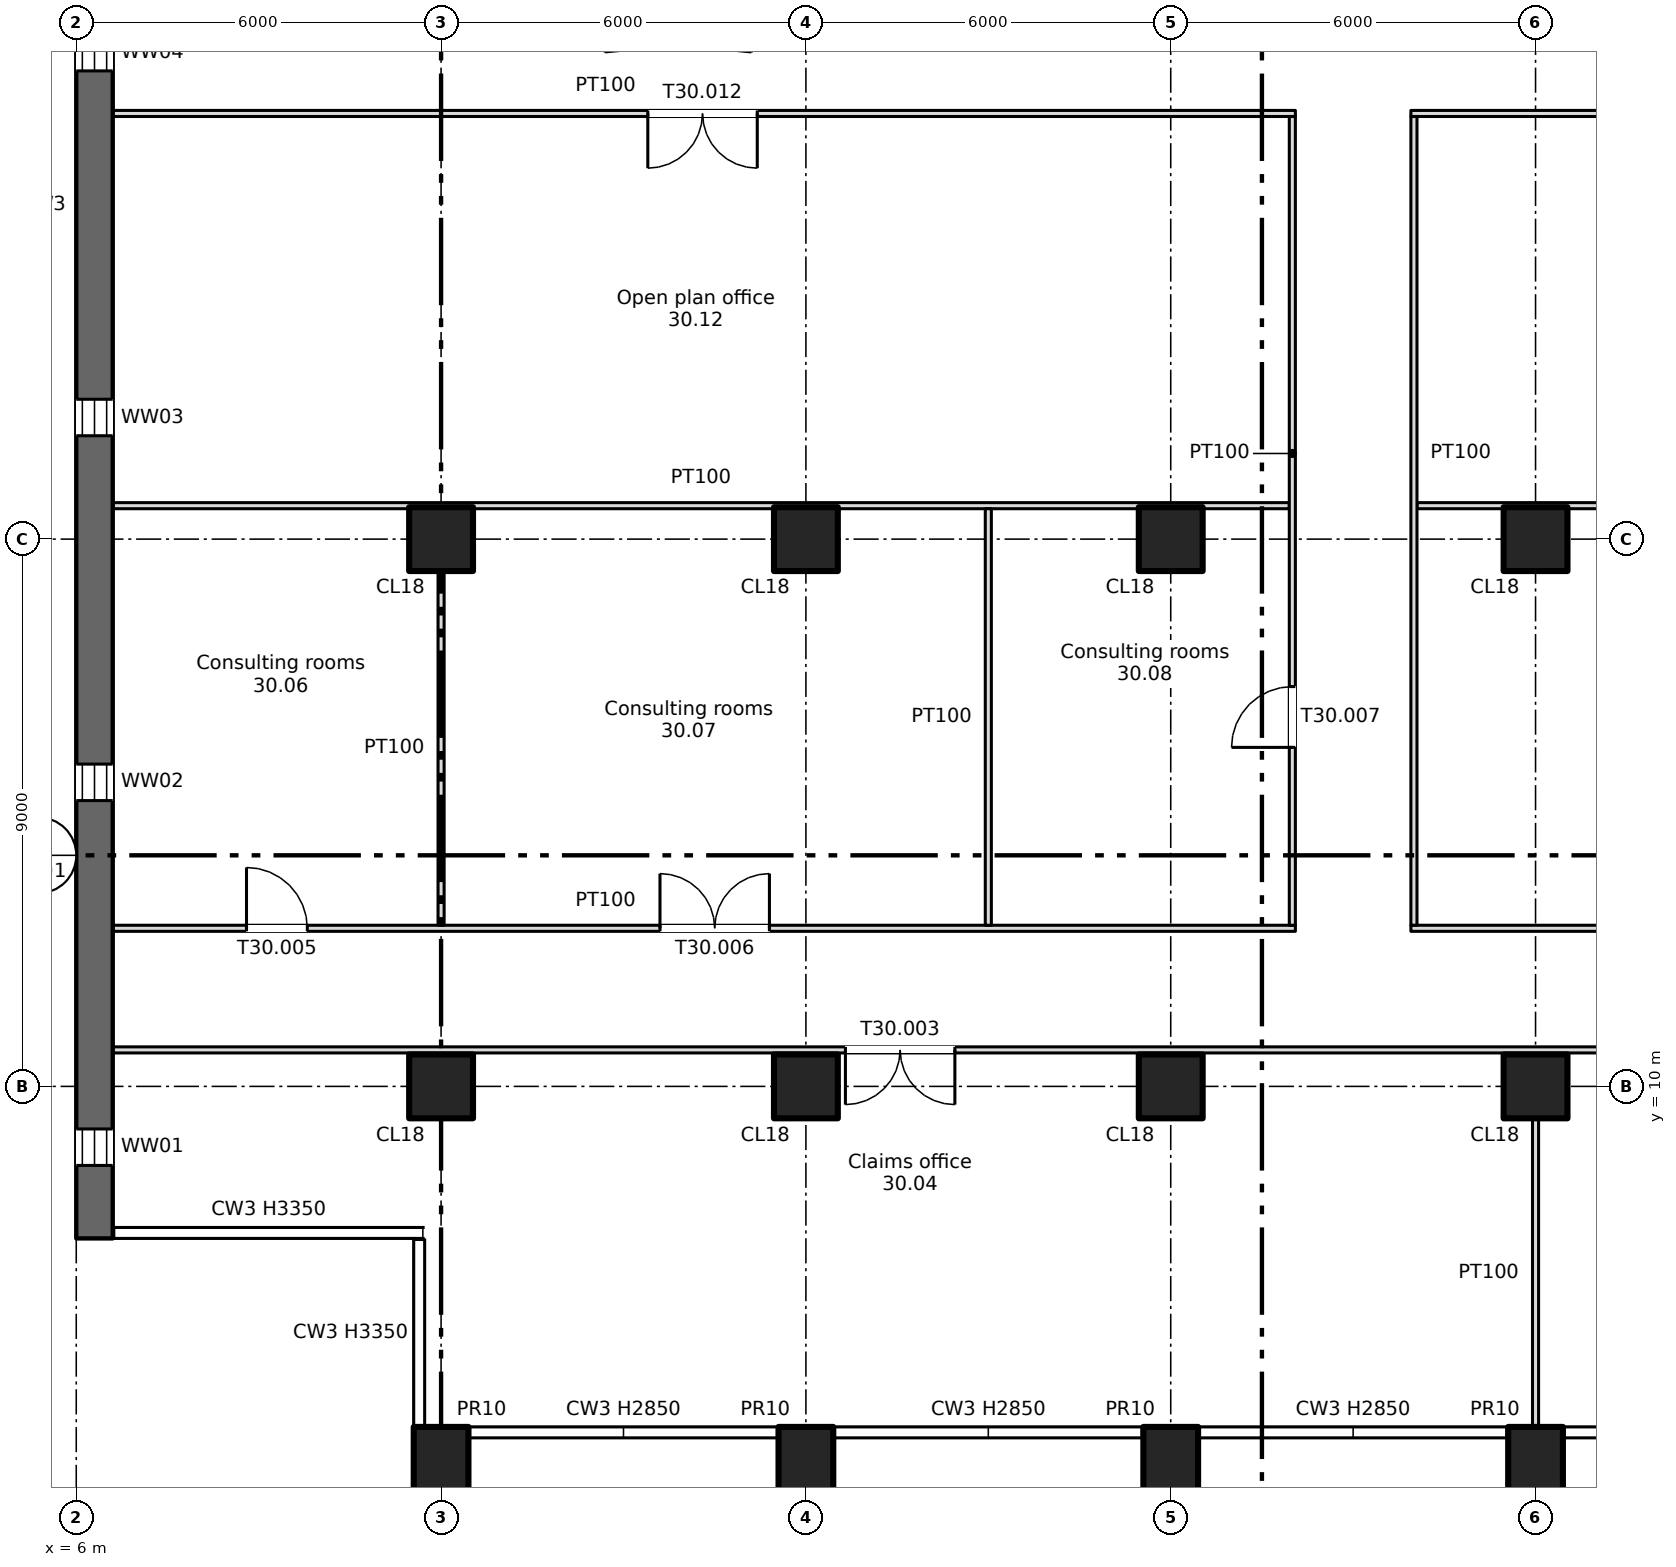
"""IFC4 building model, lengths in metres.
Left out: names, types, materials, properties, quantities, classifications, styles, units other than length and angle.
Written with IfcOpenShell. Run it as: python <this file> out.ifc"""

import sys

from ifc_helpers import new_model, si_unit, direction, frame, frame_2d, origin, origin_2d, place, context, subcontext, project, spatial, rectangle, extrude, element, fill, save


model = new_model("IFC4")
c1 = context("Model", 3, precision=1e-05, world=origin(), true_north=direction((0.0, 1.0)))
c2 = subcontext(c1, "Body", "Model", "MODEL_VIEW")
j1 = project(units=[si_unit("LENGTHUNIT", "METRE"), si_unit("PLANEANGLEUNIT", "RADIAN")], contexts=[c1])
p1 = place(None, origin())
s1 = spatial("IfcSite", under=j1, at=p1, CompositionType="ELEMENT")
p2 = place(p1, origin())
s2 = spatial("IfcBuilding", under=s1, at=p2, CompositionType="ELEMENT")
p3 = place(p2, frame((0.0, 0.0, 208.0)))
s3 = spatial("IfcBuildingStorey", under=s2, at=p3, CompositionType="ELEMENT", Elevation=208.0)
for number, where, z_axis, x_axis in (
    (1, (12.0, 3.7, -0.4), (0.0, 0.0, 1.0), (1.0, 0.0, 0.0)),
    (2, (18.0, 3.7, -0.4), (0.0, 0.0, 1.0), (1.0, 0.0, 0.0)),
    (3, (24.0, 3.7, -0.4), (0.0, 0.0, 1.0), (1.0, 0.0, 0.0)),
    (4, (30.0, 3.7, -0.4), (0.0, 0.0, 1.0), (1.0, 0.0, 0.0)),
):
    element("IfcColumn", number, at=place(p3, frame(where, z_axis=z_axis, x_axis=x_axis)), inside=s3, PredefinedType="COLUMN", context=c2, shape_type="SweptSolid", body=[
        extrude(rectangle(XDim=0.9, YDim=1.4, at=origin_2d()), origin(), (0.0, 0.0, 1.0), 3.75),
    ])
for number, where, z_axis, x_axis in (
    (5, (12.0, 10.0, 0.0), (0.0, 0.0, 1.0), (1.0, 0.0, 0.0)),
    (6, (12.0, 19.0, 0.0), (0.0, 0.0, 1.0), (1.0, 0.0, 0.0)),
    (7, (18.0, 10.0, 0.0), (0.0, 0.0, 1.0), (1.0, 0.0, 0.0)),
    (8, (18.0, 19.0, 0.0), (0.0, 0.0, 1.0), (1.0, 0.0, 0.0)),
    (9, (24.0, 10.0, 0.0), (0.0, 0.0, 1.0), (1.0, 0.0, 0.0)),
    (10, (24.0, 19.0, 0.0), (0.0, 0.0, 1.0), (1.0, 0.0, 0.0)),
    (11, (30.0, 10.0, 0.0), (0.0, 0.0, 1.0), (1.0, 0.0, 0.0)),
    (12, (30.0, 19.0, 0.0), (0.0, 0.0, 1.0), (1.0, 0.0, 0.0)),
):
    element("IfcColumn", number, at=place(p3, frame(where, z_axis=z_axis, x_axis=x_axis)), inside=s3, PredefinedType="COLUMN", context=c2, shape_type="SweptSolid", body=[
        extrude(rectangle(XDim=1.05, YDim=1.05, at=origin_2d()), origin(), (0.0, 0.0, 1.0), 3.35),
    ])
p4 = place(p3, frame((6.3, 7.5, 0.0), z_axis=(0.0, 0.0, 1.0), x_axis=(0.0, 1.0, 0.0)))
e13 = element("IfcWall", 13, at=p4, inside=s3, PredefinedType="SHEAR", context=c2, shape_type="SweptSolid", body=[
    extrude(rectangle(XDim=34.0, YDim=0.6, at=frame_2d((17.0, 0.0))), origin(), (0.0, 0.0, 1.0), 3.35),
])
p5 = place(p4, frame((1.2, 0.0, 0.6)))
e14 = element("IfcOpeningElement", 14, at=p5, cuts=e13, PredefinedType="OPENING", context=c2, shape_type="SweptSolid", body=[
    extrude(rectangle(XDim=0.6, YDim=2.4, at=frame_2d((0.3, 1.2))), frame((0.0, 0.31, 0.0), z_axis=(0.0, -1.0, 0.0), x_axis=(1.0, 0.0, 0.0)), (0.0, 0.0, 1.0), 0.62),
])
p6 = place(p4, frame((7.2, 0.0, 0.6)))
e15 = element("IfcOpeningElement", 15, at=p6, cuts=e13, PredefinedType="OPENING", context=c2, shape_type="SweptSolid", body=[
    extrude(rectangle(XDim=0.6, YDim=2.4, at=frame_2d((0.3, 1.2))), frame((0.0, 0.31, 0.0), z_axis=(0.0, -1.0, 0.0), x_axis=(1.0, 0.0, 0.0)), (0.0, 0.0, 1.0), 0.62),
])
p7 = place(p4, frame((13.2, 0.0, 0.6)))
e16 = element("IfcOpeningElement", 16, at=p7, cuts=e13, PredefinedType="OPENING", context=c2, shape_type="SweptSolid", body=[
    extrude(rectangle(XDim=0.6, YDim=2.4, at=frame_2d((0.3, 1.2))), frame((0.0, 0.31, 0.0), z_axis=(0.0, -1.0, 0.0), x_axis=(1.0, 0.0, 0.0)), (0.0, 0.0, 1.0), 0.62),
])
p8 = place(p4, frame((19.2, 0.0, 0.6)))
e17 = element("IfcOpeningElement", 17, at=p8, cuts=e13, PredefinedType="OPENING", context=c2, shape_type="SweptSolid", body=[
    extrude(rectangle(XDim=0.6, YDim=2.4, at=frame_2d((0.3, 1.2))), frame((0.0, 0.31, 0.0), z_axis=(0.0, -1.0, 0.0), x_axis=(1.0, 0.0, 0.0)), (0.0, 0.0, 1.0), 0.62),
])
p9 = place(p3, frame((6.6, 10.6, 0.0), z_axis=(0.0, 0.0, 1.0), x_axis=(1.0, 0.0, 0.0)))
e18 = element("IfcWall", 18, at=p9, inside=s3, PredefinedType="PARTITIONING", context=c2, shape_type="SweptSolid", body=[
    extrude(rectangle(XDim=64.8, YDim=0.1, at=frame_2d((32.4, 0.0))), origin(), (0.0, 0.0, 1.0), 3.35),
])
p10 = place(p9, frame((30.0, 0.0, 0.0)))
e19 = element("IfcOpeningElement", 19, at=p10, cuts=e18, PredefinedType="OPENING", context=c2, shape_type="SweptSolid", body=[
    extrude(rectangle(XDim=1.8, YDim=2.1, at=frame_2d((0.9, 1.05))), frame((0.0, 0.06, 0.0), z_axis=(0.0, -1.0, 0.0), x_axis=(1.0, 0.0, 0.0)), (0.0, 0.0, 1.0), 0.12),
])
p11 = place(p9, frame((42.0, 0.0, 0.0)))
e20 = element("IfcOpeningElement", 20, at=p11, cuts=e18, PredefinedType="OPENING", context=c2, shape_type="SweptSolid", body=[
    extrude(rectangle(XDim=1.8, YDim=2.1, at=frame_2d((0.9, 1.05))), frame((0.0, 0.06, 0.0), z_axis=(0.0, -1.0, 0.0), x_axis=(1.0, 0.0, 0.0)), (0.0, 0.0, 1.0), 0.12),
])
p12 = place(p9, frame((12.05, 0.0, 0.0)))
e21 = element("IfcOpeningElement", 21, at=p12, cuts=e18, PredefinedType="OPENING", context=c2, shape_type="SweptSolid", body=[
    extrude(rectangle(XDim=1.8, YDim=2.1, at=frame_2d((0.9, 1.05))), frame((0.0, 0.06, 0.0), z_axis=(0.0, -1.0, 0.0), x_axis=(1.0, 0.0, 0.0)), (0.0, 0.0, 1.0), 0.12),
])
p13 = place(p9, frame((55.2, 0.0, 0.0)))
e22 = element("IfcOpeningElement", 22, at=p13, cuts=e18, PredefinedType="OPENING", context=c2, shape_type="SweptSolid", body=[
    extrude(rectangle(XDim=1.8, YDim=2.1, at=frame_2d((0.9, 1.05))), frame((0.0, 0.06, 0.0), z_axis=(0.0, -1.0, 0.0), x_axis=(1.0, 0.0, 0.0)), (0.0, 0.0, 1.0), 0.12),
])
p14 = place(p3, frame((6.6, 12.6, 0.0), z_axis=(0.0, 0.0, 1.0), x_axis=(1.0, 0.0, 0.0)))
e23 = element("IfcWall", 23, at=p14, inside=s3, PredefinedType="PARTITIONING", context=c2, shape_type="SweptSolid", body=[
    extrude(rectangle(XDim=19.45, YDim=0.1, at=frame_2d((9.725, 0.0))), origin(), (0.0, 0.0, 1.0), 3.35),
])
p15 = place(p14, frame((2.2, 0.0, 0.0)))
e24 = element("IfcOpeningElement", 24, at=p15, cuts=e23, PredefinedType="OPENING", context=c2, shape_type="SweptSolid", body=[
    extrude(rectangle(XDim=1.0, YDim=2.1, at=frame_2d((0.5, 1.05))), frame((0.0, 0.06, 0.0), z_axis=(0.0, -1.0, 0.0), x_axis=(1.0, 0.0, 0.0)), (0.0, 0.0, 1.0), 0.12),
])
p16 = place(p14, frame((9.0, 0.0, 0.0)))
e25 = element("IfcOpeningElement", 25, at=p16, cuts=e23, PredefinedType="OPENING", context=c2, shape_type="SweptSolid", body=[
    extrude(rectangle(XDim=1.8, YDim=2.1, at=frame_2d((0.9, 1.05))), frame((0.0, 0.06, 0.0), z_axis=(0.0, -1.0, 0.0), x_axis=(1.0, 0.0, 0.0)), (0.0, 0.0, 1.0), 0.12),
])
p17 = place(p3, frame((27.95, 12.6, 0.0), z_axis=(0.0, 0.0, 1.0), x_axis=(1.0, 0.0, 0.0)))
e26 = element("IfcWall", 26, at=p17, inside=s3, PredefinedType="PARTITIONING", context=c2, shape_type="SweptSolid", body=[
    extrude(rectangle(XDim=22.1, YDim=0.1, at=frame_2d((11.05, 0.0))), origin(), (0.0, 0.0, 1.0), 3.35),
])
p18 = place(p17, frame((4.95, 0.0, 0.0)))
e27 = element("IfcOpeningElement", 27, at=p18, cuts=e26, PredefinedType="OPENING", context=c2, shape_type="SweptSolid", body=[
    extrude(rectangle(XDim=1.2, YDim=2.1, at=frame_2d((0.6, 1.05))), frame((0.0, 0.06, 0.0), z_axis=(0.0, -1.0, 0.0), x_axis=(1.0, 0.0, 0.0)), (0.0, 0.0, 1.0), 0.12),
])
p19 = place(p17, frame((15.95, 0.0, 0.0)))
e28 = element("IfcOpeningElement", 28, at=p19, cuts=e26, PredefinedType="OPENING", context=c2, shape_type="SweptSolid", body=[
    extrude(rectangle(XDim=1.2, YDim=2.1, at=frame_2d((0.6, 1.05))), frame((0.0, 0.06, 0.0), z_axis=(0.0, -1.0, 0.0), x_axis=(1.0, 0.0, 0.0)), (0.0, 0.0, 1.0), 0.12),
])
p20 = place(p3, frame((6.6, 19.55, 0.0), z_axis=(0.0, 0.0, 1.0), x_axis=(1.0, 0.0, 0.0)))
e29 = element("IfcWall", 29, at=p20, inside=s3, PredefinedType="PARTITIONING", context=c2, shape_type="SweptSolid", body=[
    extrude(rectangle(XDim=19.35, YDim=0.1, at=frame_2d((9.675, 0.0))), origin(), (0.0, 0.0, 1.0), 3.35),
])
p21 = place(p3, frame((28.05, 19.55, 0.0), z_axis=(0.0, 0.0, 1.0), x_axis=(1.0, 0.0, 0.0)))
e30 = element("IfcWall", 30, at=p21, inside=s3, PredefinedType="PARTITIONING", context=c2, shape_type="SweptSolid", body=[
    extrude(rectangle(XDim=21.9, YDim=0.1, at=frame_2d((10.95, 0.0))), origin(), (0.0, 0.0, 1.0), 3.35),
])
p22 = place(p3, frame((6.6, 26.0, 0.0), z_axis=(0.0, 0.0, 1.0), x_axis=(1.0, 0.0, 0.0)))
e31 = element("IfcWall", 31, at=p22, inside=s3, PredefinedType="PARTITIONING", context=c2, shape_type="SweptSolid", body=[
    extrude(rectangle(XDim=19.45, YDim=0.1, at=frame_2d((9.725, 0.0))), origin(), (0.0, 0.0, 1.0), 3.35),
])
p23 = place(p22, frame((8.8, 0.0, 0.0)))
e32 = element("IfcOpeningElement", 32, at=p23, cuts=e31, PredefinedType="OPENING", context=c2, shape_type="SweptSolid", body=[
    extrude(rectangle(XDim=1.8, YDim=2.1, at=frame_2d((0.9, 1.05))), frame((0.0, 0.06, 0.0), z_axis=(0.0, -1.0, 0.0), x_axis=(1.0, 0.0, 0.0)), (0.0, 0.0, 1.0), 0.12),
])
p24 = place(p3, frame((27.95, 26.0, 0.0), z_axis=(0.0, 0.0, 1.0), x_axis=(1.0, 0.0, 0.0)))
e33 = element("IfcWall", 33, at=p24, inside=s3, PredefinedType="PARTITIONING", context=c2, shape_type="SweptSolid", body=[
    extrude(rectangle(XDim=22.1, YDim=0.1, at=frame_2d((11.05, 0.0))), origin(), (0.0, 0.0, 1.0), 3.35),
])
p25 = place(p24, frame((10.15, 0.0, 0.0)))
e34 = element("IfcOpeningElement", 34, at=p25, cuts=e33, PredefinedType="OPENING", context=c2, shape_type="SweptSolid", body=[
    extrude(rectangle(XDim=1.8, YDim=2.1, at=frame_2d((0.9, 1.05))), frame((0.0, 0.06, 0.0), z_axis=(0.0, -1.0, 0.0), x_axis=(1.0, 0.0, 0.0)), (0.0, 0.0, 1.0), 0.12),
])
p26 = place(p3, frame((12.0, 12.65, 0.0), z_axis=(0.0, 0.0, 1.0), x_axis=(0.0, 1.0, 0.0)))
e35 = element("IfcWall", 35, at=p26, inside=s3, PredefinedType="PARTITIONING", context=c2, shape_type="SweptSolid", body=[
    extrude(rectangle(XDim=5.825, YDim=0.1, at=frame_2d((2.913, 0.0))), origin(), (0.0, 0.0, 1.0), 3.35),
])
p27 = place(p3, frame((21.0, 12.65, 0.0), z_axis=(0.0, 0.0, 1.0), x_axis=(0.0, 1.0, 0.0)))
e36 = element("IfcWall", 36, at=p27, inside=s3, PredefinedType="PARTITIONING", context=c2, shape_type="SweptSolid", body=[
    extrude(rectangle(XDim=6.85, YDim=0.1, at=frame_2d((3.425, 0.0))), origin(), (0.0, 0.0, 1.0), 3.35),
])
p28 = place(p3, frame((26.0, 12.65, 0.0), z_axis=(0.0, 0.0, 1.0), x_axis=(0.0, 1.0, 0.0)))
e37 = element("IfcWall", 37, at=p28, inside=s3, PredefinedType="PARTITIONING", context=c2, shape_type="SweptSolid", body=[
    extrude(rectangle(XDim=13.3, YDim=0.1, at=frame_2d((6.65, 0.0))), origin(), (0.0, 0.0, 1.0), 3.35),
])
p29 = place(p28, frame((2.925, 0.0, 0.0)))
e38 = element("IfcOpeningElement", 38, at=p29, cuts=e37, PredefinedType="OPENING", context=c2, shape_type="SweptSolid", body=[
    extrude(rectangle(XDim=1.0, YDim=2.1, at=frame_2d((0.5, 1.05))), frame((0.0, 0.06, 0.0), z_axis=(0.0, -1.0, 0.0), x_axis=(1.0, 0.0, 0.0)), (0.0, 0.0, 1.0), 0.12),
])
p30 = place(p3, frame((28.0, 12.65, 0.0), z_axis=(0.0, 0.0, 1.0), x_axis=(0.0, 1.0, 0.0)))
e39 = element("IfcWall", 39, at=p30, inside=s3, PredefinedType="PARTITIONING", context=c2, shape_type="SweptSolid", body=[
    extrude(rectangle(XDim=13.3, YDim=0.1, at=frame_2d((6.65, 0.0))), origin(), (0.0, 0.0, 1.0), 3.35),
])
p31 = place(p3, frame((30.0, 4.4, 0.0), z_axis=(0.0, 0.0, 1.0), x_axis=(0.0, 1.0, 0.0)))
e40 = element("IfcWall", 40, at=p31, inside=s3, PredefinedType="PARTITIONING", context=c2, shape_type="SweptSolid", body=[
    extrude(rectangle(XDim=5.075, YDim=0.1, at=frame_2d((2.538, 0.0))), origin(), (0.0, 0.0, 1.0), 3.35),
])
p32 = place(p5, origin())
e41 = element("IfcWindow", 41, at=p32, inside=s3, PartitioningType="SINGLE_PANEL", PredefinedType="WINDOW", context=c2, shape_type="SweptSolid", body=[
    extrude(rectangle(XDim=0.6, YDim=2.4, at=frame_2d((0.3, 1.2))), frame((0.0, 0.03, 0.0), z_axis=(0.0, -1.0, 0.0), x_axis=(1.0, 0.0, 0.0)), (0.0, 0.0, 1.0), 0.06),
])
fill(e14, e41)
p33 = place(p6, origin())
e42 = element("IfcWindow", 42, at=p33, inside=s3, PartitioningType="SINGLE_PANEL", PredefinedType="WINDOW", context=c2, shape_type="SweptSolid", body=[
    extrude(rectangle(XDim=0.6, YDim=2.4, at=frame_2d((0.3, 1.2))), frame((0.0, 0.03, 0.0), z_axis=(0.0, -1.0, 0.0), x_axis=(1.0, 0.0, 0.0)), (0.0, 0.0, 1.0), 0.06),
])
fill(e15, e42)
p34 = place(p7, origin())
e43 = element("IfcWindow", 43, at=p34, inside=s3, PartitioningType="SINGLE_PANEL", PredefinedType="WINDOW", context=c2, shape_type="SweptSolid", body=[
    extrude(rectangle(XDim=0.6, YDim=2.4, at=frame_2d((0.3, 1.2))), frame((0.0, 0.03, 0.0), z_axis=(0.0, -1.0, 0.0), x_axis=(1.0, 0.0, 0.0)), (0.0, 0.0, 1.0), 0.06),
])
fill(e16, e43)
p35 = place(p8, origin())
e44 = element("IfcWindow", 44, at=p35, inside=s3, PartitioningType="SINGLE_PANEL", PredefinedType="WINDOW", context=c2, shape_type="SweptSolid", body=[
    extrude(rectangle(XDim=0.6, YDim=2.4, at=frame_2d((0.3, 1.2))), frame((0.0, 0.03, 0.0), z_axis=(0.0, -1.0, 0.0), x_axis=(1.0, 0.0, 0.0)), (0.0, 0.0, 1.0), 0.06),
])
fill(e17, e44)
p36 = place(p12, origin())
e45 = element("IfcDoor", 45, at=p36, inside=s3, OperationType="DOUBLE_DOOR_SINGLE_SWING", PredefinedType="DOOR", context=c2, shape_type="SweptSolid", body=[
    extrude(rectangle(XDim=1.8, YDim=2.1, at=frame_2d((0.9, 1.05))), frame((0.0, 0.025, 0.0), z_axis=(0.0, -1.0, 0.0), x_axis=(1.0, 0.0, 0.0)), (0.0, 0.0, 1.0), 0.05),
])
fill(e21, e45)
p37 = place(p15, origin())
e46 = element("IfcDoor", 46, at=p37, inside=s3, OperationType="SINGLE_SWING_LEFT", PredefinedType="DOOR", context=c2, shape_type="SweptSolid", body=[
    extrude(rectangle(XDim=1.0, YDim=2.1, at=frame_2d((0.5, 1.05))), frame((0.0, 0.025, 0.0), z_axis=(0.0, -1.0, 0.0), x_axis=(1.0, 0.0, 0.0)), (0.0, 0.0, 1.0), 0.05),
])
fill(e24, e46)
p38 = place(p16, origin())
e47 = element("IfcDoor", 47, at=p38, inside=s3, OperationType="DOUBLE_DOOR_SINGLE_SWING", PredefinedType="DOOR", context=c2, shape_type="SweptSolid", body=[
    extrude(rectangle(XDim=1.8, YDim=2.1, at=frame_2d((0.9, 1.05))), frame((0.0, 0.025, 0.0), z_axis=(0.0, -1.0, 0.0), x_axis=(1.0, 0.0, 0.0)), (0.0, 0.0, 1.0), 0.05),
])
fill(e25, e47)
p39 = place(p29, origin())
e48 = element("IfcDoor", 48, at=p39, inside=s3, OperationType="SINGLE_SWING_LEFT", PredefinedType="DOOR", context=c2, shape_type="SweptSolid", body=[
    extrude(rectangle(XDim=1.0, YDim=2.1, at=frame_2d((0.5, 1.05))), frame((0.0, 0.025, 0.0), z_axis=(0.0, -1.0, 0.0), x_axis=(1.0, 0.0, 0.0)), (0.0, 0.0, 1.0), 0.05),
])
fill(e38, e48)
p40 = place(p23, origin())
e49 = element("IfcDoor", 49, at=p40, inside=s3, OperationType="DOUBLE_DOOR_SINGLE_SWING", PredefinedType="DOOR", context=c2, shape_type="SweptSolid", body=[
    extrude(rectangle(XDim=1.8, YDim=2.1, at=frame_2d((0.9, 1.05))), frame((0.0, 0.025, 0.0), z_axis=(0.0, -1.0, 0.0), x_axis=(1.0, 0.0, 0.0)), (0.0, 0.0, 1.0), 0.05),
])
fill(e32, e49)
save(model, sys.argv[1])
